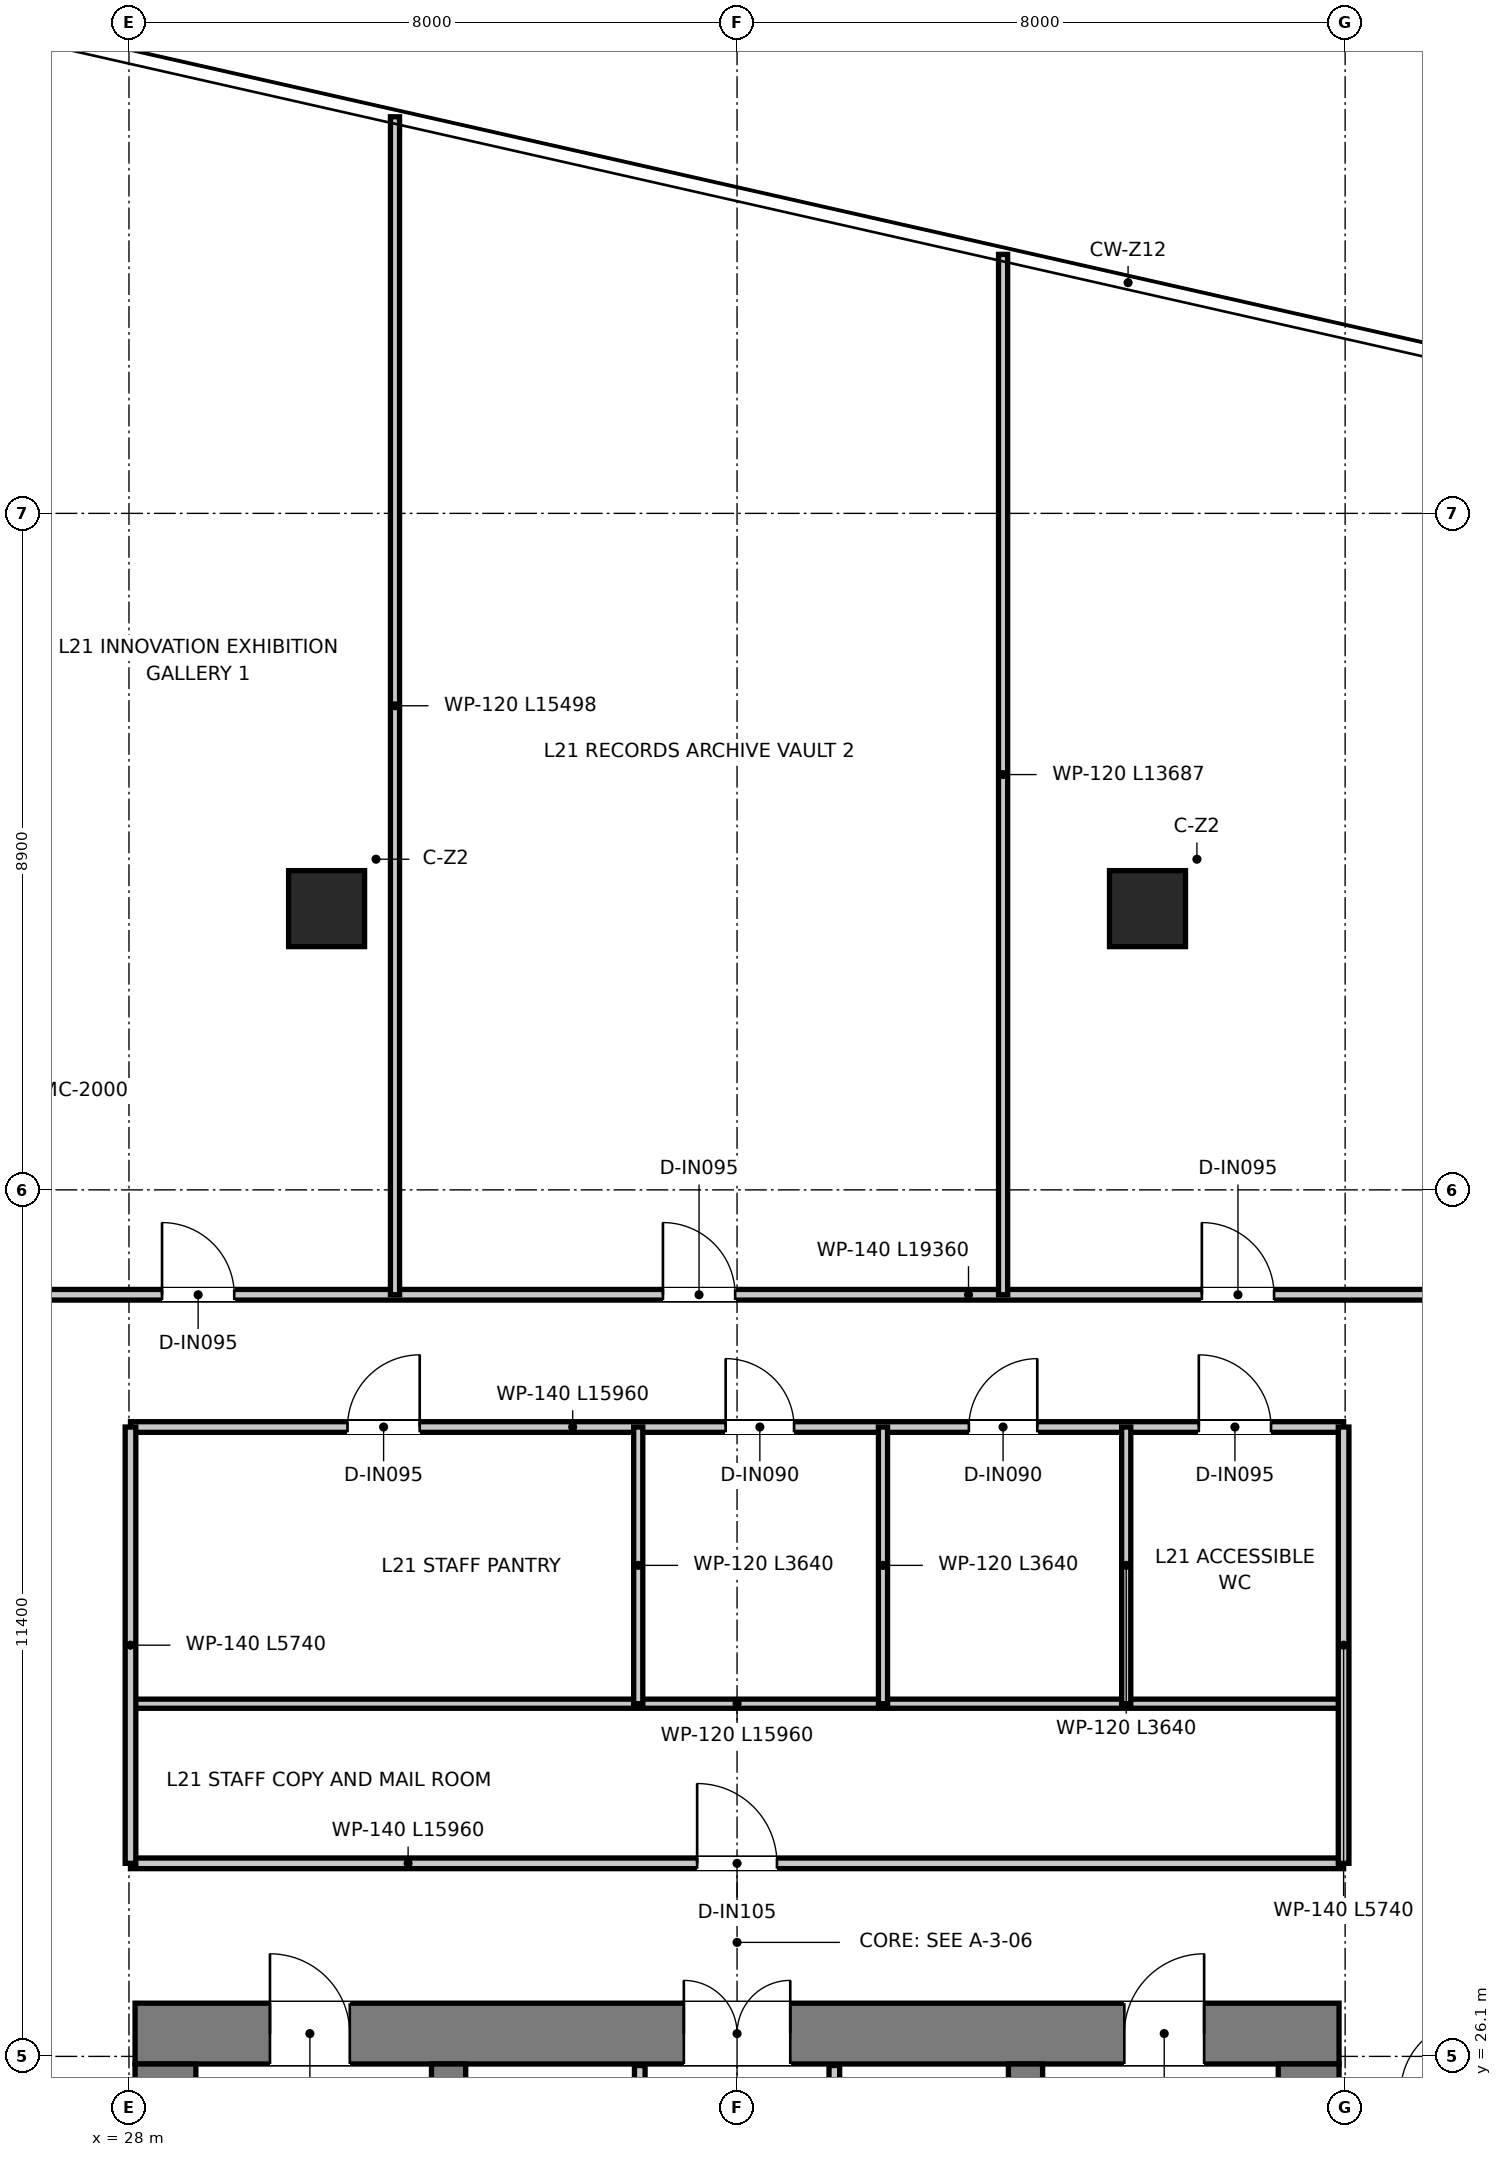
"""IFC4 building model, lengths in metres.
Left out: names, types, materials, properties, quantities, classifications, styles, units other than length and angle.
Written with IfcOpenShell. Run it as: python <this file> out.ifc"""

import sys

from ifc_helpers import new_model, si_unit, direction, frame, frame_2d, origin, origin_2d, place, context, subcontext, project, spatial, rectangle, extrude, source, transform, mapped, element, fill, save


model = new_model("IFC4")
c1 = context("Model", 3, precision=1e-05, world=origin(), true_north=direction((0.0, 1.0)))
c2 = subcontext(c1, "Body", "Model", "MODEL_VIEW")
j1 = project(units=[si_unit("LENGTHUNIT", "METRE"), si_unit("PLANEANGLEUNIT", "RADIAN")], contexts=[c1])
p1 = place(None, origin())
s1 = spatial("IfcSite", under=j1, at=p1, CompositionType="ELEMENT")
p2 = place(p1, origin())
s2 = spatial("IfcBuilding", under=s1, at=p2, CompositionType="ELEMENT")
p3 = place(p2, frame((0.0, 0.0, 90.05)))
s3 = spatial("IfcBuildingStorey", under=s2, at=p3, CompositionType="ELEMENT", Elevation=90.05)
p4 = place(p3, frame((28.08, 26.4, 0.0), z_axis=(0.0, 0.0, 1.0), x_axis=(1.0, 0.0, 0.0)))
e1 = element("IfcWall", 1, at=p4, inside=s3, PredefinedType="SHEAR", context=c2, shape_type="SweptSolid", body=[
    extrude(rectangle(XDim=15.84, YDim=0.8, at=frame_2d((7.92, 0.0))), origin(), (0.0, 0.0, 1.0), 3.95),
])
p5 = place(p4, frame((7.22, 0.0, 0.0)))
e2 = element("IfcOpeningElement", 2, at=p5, cuts=e1, PredefinedType="OPENING", context=c2, shape_type="SweptSolid", body=[
    extrude(rectangle(XDim=1.4, YDim=2.2, at=frame_2d((0.7, 1.1))), frame((0.0, 0.41, 0.0), z_axis=(0.0, -1.0, 0.0), x_axis=(1.0, 0.0, 0.0)), (0.0, 0.0, 1.0), 0.82),
])
p6 = place(p4, frame((1.775, 0.0, 0.0)))
e3 = element("IfcOpeningElement", 3, at=p6, cuts=e1, PredefinedType="OPENING", context=c2, shape_type="SweptSolid", body=[
    extrude(rectangle(XDim=1.05, YDim=2.1, at=frame_2d((0.525, 1.05))), frame((0.0, 0.41, 0.0), z_axis=(0.0, -1.0, 0.0), x_axis=(1.0, 0.0, 0.0)), (0.0, 0.0, 1.0), 0.82),
])
p7 = place(p4, frame((13.015, 0.0, 0.0)))
e4 = element("IfcOpeningElement", 4, at=p7, cuts=e1, PredefinedType="OPENING", context=c2, shape_type="SweptSolid", body=[
    extrude(rectangle(XDim=1.05, YDim=2.1, at=frame_2d((0.525, 1.05))), frame((0.0, 0.41, 0.0), z_axis=(0.0, -1.0, 0.0), x_axis=(1.0, 0.0, 0.0)), (0.0, 0.0, 1.0), 0.82),
])
for number, where, z_axis, x_axis in (
    (5, (28.48, 11.3, 0.0), (0.0, 0.0, 1.0), (0.0, 1.0, 0.0)),
    (6, (43.52, 11.3, 0.0), (0.0, 0.0, 1.0), (0.0, 1.0, 0.0)),
):
    element("IfcWall", number, at=place(p3, frame(where, z_axis=z_axis, x_axis=x_axis)), inside=s3, PredefinedType="SHEAR", context=c2, shape_type="SweptSolid", body=[
        extrude(rectangle(XDim=14.7, YDim=0.8, at=frame_2d((7.35, 0.0))), origin(), (0.0, 0.0, 1.0), 3.95),
    ])
p8 = place(p3, frame((32.205, 13.22, 0.0), z_axis=(0.0, 0.0, 1.0), x_axis=(0.0, 1.0, 0.0)))
e7 = element("IfcWall", 7, at=p8, inside=s3, PredefinedType="SHEAR", context=c2, shape_type="SweptSolid", body=[
    extrude(rectangle(XDim=12.78, YDim=0.45, at=frame_2d((6.39, 0.0))), origin(), (0.0, 0.0, 1.0), 3.95),
])
p9 = place(p8, frame((10.58, 0.0, 0.0)))
e8 = element("IfcOpeningElement", 8, at=p9, cuts=e7, PredefinedType="OPENING", context=c2, shape_type="SweptSolid", body=[
    extrude(rectangle(XDim=1.1, YDim=2.15, at=frame_2d((0.55, 1.075))), frame((0.0, 0.235, 0.0), z_axis=(0.0, -1.0, 0.0), x_axis=(1.0, 0.0, 0.0)), (0.0, 0.0, 1.0), 0.47),
])
p10 = place(p3, frame((39.795, 13.22, 0.0), z_axis=(0.0, 0.0, 1.0), x_axis=(0.0, 1.0, 0.0)))
e9 = element("IfcWall", 9, at=p10, inside=s3, PredefinedType="SHEAR", context=c2, shape_type="SweptSolid", body=[
    extrude(rectangle(XDim=12.78, YDim=0.45, at=frame_2d((6.39, 0.0))), origin(), (0.0, 0.0, 1.0), 3.95),
])
p11 = place(p10, frame((10.58, 0.0, 0.0)))
e10 = element("IfcOpeningElement", 10, at=p11, cuts=e9, PredefinedType="OPENING", context=c2, shape_type="SweptSolid", body=[
    extrude(rectangle(XDim=1.1, YDim=2.15, at=frame_2d((0.55, 1.075))), frame((0.0, 0.235, 0.0), z_axis=(0.0, -1.0, 0.0), x_axis=(1.0, 0.0, 0.0)), (0.0, 0.0, 1.0), 0.47),
])
m1 = source(origin(), c2, "Body", "SweptSolid", [
    extrude(rectangle(XDim=1.0, YDim=1.0, at=origin_2d()), origin(), (0.0, 0.0, 1.0), 3.95),
])
for number, where, z_axis, x_axis in (
    (11, (30.6, 41.2, 0.0), (0.0, 0.0, 1.0), (1.0, 0.0, 0.0)),
    (12, (41.4, 41.2, 0.0), (0.0, 0.0, 1.0), (1.0, 0.0, 0.0)),
):
    element("IfcColumn", number, at=place(p3, frame(where, z_axis=z_axis, x_axis=x_axis)), inside=s3, PredefinedType="COLUMN", context=c2, shape_type="MappedRepresentation", body=[
        mapped(m1, transform((0.0, 0.0, 0.0), x_axis=(1.0, 0.0, 0.0), y_axis=(0.0, 1.0, 0.0), z_axis=(0.0, 0.0, 1.0), scale=1.0)),
    ])
p12 = place(p3, frame((34.72, 20.2, 0.0), z_axis=(0.0, 0.0, 1.0), x_axis=(0.0, 1.0, 0.0)))
e13 = element("IfcWall", 13, at=p12, inside=s3, PredefinedType="PARTITIONING", context=c2, shape_type="SweptSolid", body=[
    extrude(rectangle(XDim=5.78, YDim=0.14, at=frame_2d((2.89, 0.0))), origin(), (0.0, 0.0, 1.0), 2.47),
])
p13 = place(p12, frame((1.05, 0.0, 0.0)))
e14 = element("IfcOpeningElement", 14, at=p13, cuts=e13, PredefinedType="OPENING", context=c2, shape_type="SweptSolid", body=[
    extrude(rectangle(XDim=0.9, YDim=2.1, at=frame_2d((0.45, 1.05))), frame((0.0, 0.08, 0.0), z_axis=(0.0, -1.0, 0.0), x_axis=(1.0, 0.0, 0.0)), (0.0, 0.0, 1.0), 0.16),
])
p14 = place(p3, frame((37.28, 20.2, 0.0), z_axis=(0.0, 0.0, 1.0), x_axis=(0.0, 1.0, 0.0)))
e15 = element("IfcWall", 15, at=p14, inside=s3, PredefinedType="PARTITIONING", context=c2, shape_type="SweptSolid", body=[
    extrude(rectangle(XDim=5.78, YDim=0.14, at=frame_2d((2.89, 0.0))), origin(), (0.0, 0.0, 1.0), 2.47),
])
p15 = place(p14, frame((0.95, 0.0, 0.0)))
e16 = element("IfcOpeningElement", 16, at=p15, cuts=e15, PredefinedType="OPENING", context=c2, shape_type="SweptSolid", body=[
    extrude(rectangle(XDim=1.1, YDim=2.15, at=frame_2d((0.55, 1.075))), frame((0.0, 0.08, 0.0), z_axis=(0.0, -1.0, 0.0), x_axis=(1.0, 0.0, 0.0)), (0.0, 0.0, 1.0), 0.16),
])
p16 = place(p3, frame((28.02, 28.64, 0.0), z_axis=(0.0, 0.0, 1.0), x_axis=(1.0, 0.0, 0.0)))
e17 = element("IfcWall", 17, at=p16, inside=s3, PredefinedType="PARTITIONING", context=c2, shape_type="SweptSolid", body=[
    extrude(rectangle(XDim=15.96, YDim=0.14, at=frame_2d((7.98, 0.0))), origin(), (0.0, 0.0, 1.0), 3.08),
])
p17 = place(p16, frame((7.455, 0.0, 0.0)))
e18 = element("IfcOpeningElement", 18, at=p17, cuts=e17, PredefinedType="OPENING", context=c2, shape_type="SweptSolid", body=[
    extrude(rectangle(XDim=1.05, YDim=2.15, at=frame_2d((0.525, 1.075))), frame((0.0, 0.08, 0.0), z_axis=(0.0, -1.0, 0.0), x_axis=(1.0, 0.0, 0.0)), (0.0, 0.0, 1.0), 0.16),
])
p18 = place(p3, frame((28.02, 30.74, 0.0), z_axis=(0.0, 0.0, 1.0), x_axis=(1.0, 0.0, 0.0)))
e19 = element("IfcWall", 19, at=p18, inside=s3, PredefinedType="PARTITIONING", context=c2, shape_type="SweptSolid", body=[
    extrude(rectangle(XDim=15.96, YDim=0.12, at=frame_2d((7.98, 0.0))), origin(), (0.0, 0.0, 1.0), 3.08),
])
p19 = place(p3, frame((28.02, 34.38, 0.0), z_axis=(0.0, 0.0, 1.0), x_axis=(1.0, 0.0, 0.0)))
e20 = element("IfcWall", 20, at=p19, inside=s3, PredefinedType="PARTITIONING", context=c2, shape_type="SweptSolid", body=[
    extrude(rectangle(XDim=15.96, YDim=0.14, at=frame_2d((7.98, 0.0))), origin(), (0.0, 0.0, 1.0), 3.08),
])
p20 = place(p19, frame((7.83, 0.0, 0.0)))
e21 = element("IfcOpeningElement", 21, at=p20, cuts=e20, PredefinedType="OPENING", context=c2, shape_type="SweptSolid", body=[
    extrude(rectangle(XDim=0.9, YDim=2.1, at=frame_2d((0.45, 1.05))), frame((0.0, 0.08, 0.0), z_axis=(0.0, -1.0, 0.0), x_axis=(1.0, 0.0, 0.0)), (0.0, 0.0, 1.0), 0.16),
])
p21 = place(p19, frame((11.03, 0.0, 0.0)))
e22 = element("IfcOpeningElement", 22, at=p21, cuts=e20, PredefinedType="OPENING", context=c2, shape_type="SweptSolid", body=[
    extrude(rectangle(XDim=0.9, YDim=2.1, at=frame_2d((0.45, 1.05))), frame((0.0, 0.08, 0.0), z_axis=(0.0, -1.0, 0.0), x_axis=(1.0, 0.0, 0.0)), (0.0, 0.0, 1.0), 0.16),
])
p22 = place(p19, frame((14.055, 0.0, 0.0)))
e23 = element("IfcOpeningElement", 23, at=p22, cuts=e20, PredefinedType="OPENING", context=c2, shape_type="SweptSolid", body=[
    extrude(rectangle(XDim=0.95, YDim=2.1, at=frame_2d((0.475, 1.05))), frame((0.0, 0.08, 0.0), z_axis=(0.0, -1.0, 0.0), x_axis=(1.0, 0.0, 0.0)), (0.0, 0.0, 1.0), 0.16),
])
p23 = place(p19, frame((2.855, 0.0, 0.0)))
e24 = element("IfcOpeningElement", 24, at=p23, cuts=e20, PredefinedType="OPENING", context=c2, shape_type="SweptSolid", body=[
    extrude(rectangle(XDim=0.95, YDim=2.1, at=frame_2d((0.475, 1.05))), frame((0.0, 0.08, 0.0), z_axis=(0.0, -1.0, 0.0), x_axis=(1.0, 0.0, 0.0)), (0.0, 0.0, 1.0), 0.16),
])
for number, where, z_axis, x_axis in (
    (25, (28.02, 28.64, 0.0), (0.0, 0.0, 1.0), (0.0, 1.0, 0.0)),
    (26, (43.98, 28.64, 0.0), (0.0, 0.0, 1.0), (0.0, 1.0, 0.0)),
):
    element("IfcWall", number, at=place(p3, frame(where, z_axis=z_axis, x_axis=x_axis)), inside=s3, PredefinedType="PARTITIONING", context=c2, shape_type="SweptSolid", body=[
        extrude(rectangle(XDim=5.74, YDim=0.14, at=frame_2d((2.87, 0.0))), origin(), (0.0, 0.0, 1.0), 3.27),
    ])
for number, where, z_axis, x_axis in (
    (27, (37.92, 30.74, 0.0), (0.0, 0.0, 1.0), (0.0, 1.0, 0.0)),
    (28, (41.12, 30.74, 0.0), (0.0, 0.0, 1.0), (0.0, 1.0, 0.0)),
    (29, (34.7, 30.74, 0.0), (0.0, 0.0, 1.0), (0.0, 1.0, 0.0)),
):
    element("IfcWall", number, at=place(p3, frame(where, z_axis=z_axis, x_axis=x_axis)), inside=s3, PredefinedType="PARTITIONING", context=c2, shape_type="SweptSolid", body=[
        extrude(rectangle(XDim=3.64, YDim=0.12, at=frame_2d((1.82, 0.0))), origin(), (0.0, 0.0, 1.0), 3.17),
    ])
p24 = place(p3, frame((26.32, 36.12, 0.0), z_axis=(0.0, 0.0, 1.0), x_axis=(1.0, 0.0, 0.0)))
e30 = element("IfcWall", 30, at=p24, inside=s3, PredefinedType="PARTITIONING", context=c2, shape_type="SweptSolid", body=[
    extrude(rectangle(XDim=19.36, YDim=0.14, at=frame_2d((9.68, 0.0))), origin(), (0.0, 0.0, 1.0), 3.08),
])
p25 = place(p24, frame((2.115, 0.0, 0.0)))
e31 = element("IfcOpeningElement", 31, at=p25, cuts=e30, PredefinedType="OPENING", context=c2, shape_type="SweptSolid", body=[
    extrude(rectangle(XDim=0.95, YDim=2.1, at=frame_2d((0.475, 1.05))), frame((0.0, 0.08, 0.0), z_axis=(0.0, -1.0, 0.0), x_axis=(1.0, 0.0, 0.0)), (0.0, 0.0, 1.0), 0.16),
])
p26 = place(p24, frame((8.705, 0.0, 0.0)))
e32 = element("IfcOpeningElement", 32, at=p26, cuts=e30, PredefinedType="OPENING", context=c2, shape_type="SweptSolid", body=[
    extrude(rectangle(XDim=0.95, YDim=2.1, at=frame_2d((0.475, 1.05))), frame((0.0, 0.08, 0.0), z_axis=(0.0, -1.0, 0.0), x_axis=(1.0, 0.0, 0.0)), (0.0, 0.0, 1.0), 0.16),
])
p27 = place(p24, frame((15.795, 0.0, 0.0)))
e33 = element("IfcOpeningElement", 33, at=p27, cuts=e30, PredefinedType="OPENING", context=c2, shape_type="SweptSolid", body=[
    extrude(rectangle(XDim=0.95, YDim=2.1, at=frame_2d((0.475, 1.05))), frame((0.0, 0.08, 0.0), z_axis=(0.0, -1.0, 0.0), x_axis=(1.0, 0.0, 0.0)), (0.0, 0.0, 1.0), 0.16),
])
p28 = place(p3, frame((31.5, 36.12, 0.0), z_axis=(0.0, 0.0, 1.0), x_axis=(0.0, 1.0, 0.0)))
e34 = element("IfcWall", 34, at=p28, inside=s3, PredefinedType="PARTITIONING", context=c2, shape_type="SweptSolid", body=[
    extrude(rectangle(XDim=15.497, YDim=0.12, at=frame_2d((7.749, 0.0))), origin(), (0.0, 0.0, 1.0), 2.97),
])
p29 = place(p3, frame((39.5, 36.12, 0.0), z_axis=(0.0, 0.0, 1.0), x_axis=(0.0, 1.0, 0.0)))
e35 = element("IfcWall", 35, at=p29, inside=s3, PredefinedType="PARTITIONING", context=c2, shape_type="SweptSolid", body=[
    extrude(rectangle(XDim=13.687, YDim=0.12, at=frame_2d((6.844, 0.0))), origin(), (0.0, 0.0, 1.0), 2.97),
])
p30 = place(p5, origin())
e36 = element("IfcDoor", 36, at=p30, inside=s3, OperationType="DOUBLE_DOOR_SINGLE_SWING", PredefinedType="DOOR", context=c2, shape_type="SweptSolid", body=[
    extrude(rectangle(XDim=1.4, YDim=2.2, at=frame_2d((0.7, 1.1))), frame((0.0, 0.025, 0.0), z_axis=(0.0, -1.0, 0.0), x_axis=(1.0, 0.0, 0.0)), (0.0, 0.0, 1.0), 0.05),
])
fill(e2, e36)
p31 = place(p6, origin())
e37 = element("IfcDoor", 37, at=p31, inside=s3, OperationType="SINGLE_SWING_LEFT", PredefinedType="DOOR", context=c2, shape_type="SweptSolid", body=[
    extrude(rectangle(XDim=1.05, YDim=2.1, at=frame_2d((0.525, 1.05))), frame((0.0, 0.025, 0.0), z_axis=(0.0, -1.0, 0.0), x_axis=(1.0, 0.0, 0.0)), (0.0, 0.0, 1.0), 0.05),
])
fill(e3, e37)
p32 = place(p7, origin())
e38 = element("IfcDoor", 38, at=p32, inside=s3, OperationType="SINGLE_SWING_RIGHT", PredefinedType="DOOR", context=c2, shape_type="SweptSolid", body=[
    extrude(rectangle(XDim=1.05, YDim=2.1, at=frame_2d((0.525, 1.05))), frame((0.0, 0.025, 0.0), z_axis=(0.0, -1.0, 0.0), x_axis=(1.0, 0.0, 0.0)), (0.0, 0.0, 1.0), 0.05),
])
fill(e4, e38)
p33 = place(p17, origin())
e39 = element("IfcDoor", 39, at=p33, inside=s3, OperationType="SINGLE_SWING_LEFT", PredefinedType="DOOR", context=c2, shape_type="SweptSolid", body=[
    extrude(rectangle(XDim=1.05, YDim=2.15, at=frame_2d((0.525, 1.075))), frame((0.0, 0.025, 0.0), z_axis=(0.0, -1.0, 0.0), x_axis=(1.0, 0.0, 0.0)), (0.0, 0.0, 1.0), 0.05),
])
fill(e18, e39)
p34 = place(p20, origin())
e40 = element("IfcDoor", 40, at=p34, inside=s3, OperationType="SINGLE_SWING_LEFT", PredefinedType="DOOR", context=c2, shape_type="SweptSolid", body=[
    extrude(rectangle(XDim=0.9, YDim=2.1, at=frame_2d((0.45, 1.05))), frame((0.0, 0.025, 0.0), z_axis=(0.0, -1.0, 0.0), x_axis=(1.0, 0.0, 0.0)), (0.0, 0.0, 1.0), 0.05),
])
fill(e21, e40)
p35 = place(p21, origin())
e41 = element("IfcDoor", 41, at=p35, inside=s3, OperationType="SINGLE_SWING_RIGHT", PredefinedType="DOOR", context=c2, shape_type="SweptSolid", body=[
    extrude(rectangle(XDim=0.9, YDim=2.1, at=frame_2d((0.45, 1.05))), frame((0.0, 0.025, 0.0), z_axis=(0.0, -1.0, 0.0), x_axis=(1.0, 0.0, 0.0)), (0.0, 0.0, 1.0), 0.05),
])
fill(e22, e41)
p36 = place(p22, origin())
e42 = element("IfcDoor", 42, at=p36, inside=s3, OperationType="SINGLE_SWING_LEFT", PredefinedType="DOOR", context=c2, shape_type="SweptSolid", body=[
    extrude(rectangle(XDim=0.95, YDim=2.1, at=frame_2d((0.475, 1.05))), frame((0.0, 0.025, 0.0), z_axis=(0.0, -1.0, 0.0), x_axis=(1.0, 0.0, 0.0)), (0.0, 0.0, 1.0), 0.05),
])
fill(e23, e42)
p37 = place(p23, origin())
e43 = element("IfcDoor", 43, at=p37, inside=s3, OperationType="SINGLE_SWING_RIGHT", PredefinedType="DOOR", context=c2, shape_type="SweptSolid", body=[
    extrude(rectangle(XDim=0.95, YDim=2.1, at=frame_2d((0.475, 1.05))), frame((0.0, 0.025, 0.0), z_axis=(0.0, -1.0, 0.0), x_axis=(1.0, 0.0, 0.0)), (0.0, 0.0, 1.0), 0.05),
])
fill(e24, e43)
p38 = place(p25, origin())
e44 = element("IfcDoor", 44, at=p38, inside=s3, OperationType="SINGLE_SWING_LEFT", PredefinedType="DOOR", context=c2, shape_type="SweptSolid", body=[
    extrude(rectangle(XDim=0.95, YDim=2.1, at=frame_2d((0.475, 1.05))), frame((0.0, 0.025, 0.0), z_axis=(0.0, -1.0, 0.0), x_axis=(1.0, 0.0, 0.0)), (0.0, 0.0, 1.0), 0.05),
])
fill(e31, e44)
p39 = place(p26, origin())
e45 = element("IfcDoor", 45, at=p39, inside=s3, OperationType="SINGLE_SWING_LEFT", PredefinedType="DOOR", context=c2, shape_type="SweptSolid", body=[
    extrude(rectangle(XDim=0.95, YDim=2.1, at=frame_2d((0.475, 1.05))), frame((0.0, 0.025, 0.0), z_axis=(0.0, -1.0, 0.0), x_axis=(1.0, 0.0, 0.0)), (0.0, 0.0, 1.0), 0.05),
])
fill(e32, e45)
p40 = place(p27, origin())
e46 = element("IfcDoor", 46, at=p40, inside=s3, OperationType="SINGLE_SWING_LEFT", PredefinedType="DOOR", context=c2, shape_type="SweptSolid", body=[
    extrude(rectangle(XDim=0.95, YDim=2.1, at=frame_2d((0.475, 1.05))), frame((0.0, 0.025, 0.0), z_axis=(0.0, -1.0, 0.0), x_axis=(1.0, 0.0, 0.0)), (0.0, 0.0, 1.0), 0.05),
])
fill(e33, e46)
save(model, sys.argv[1])
